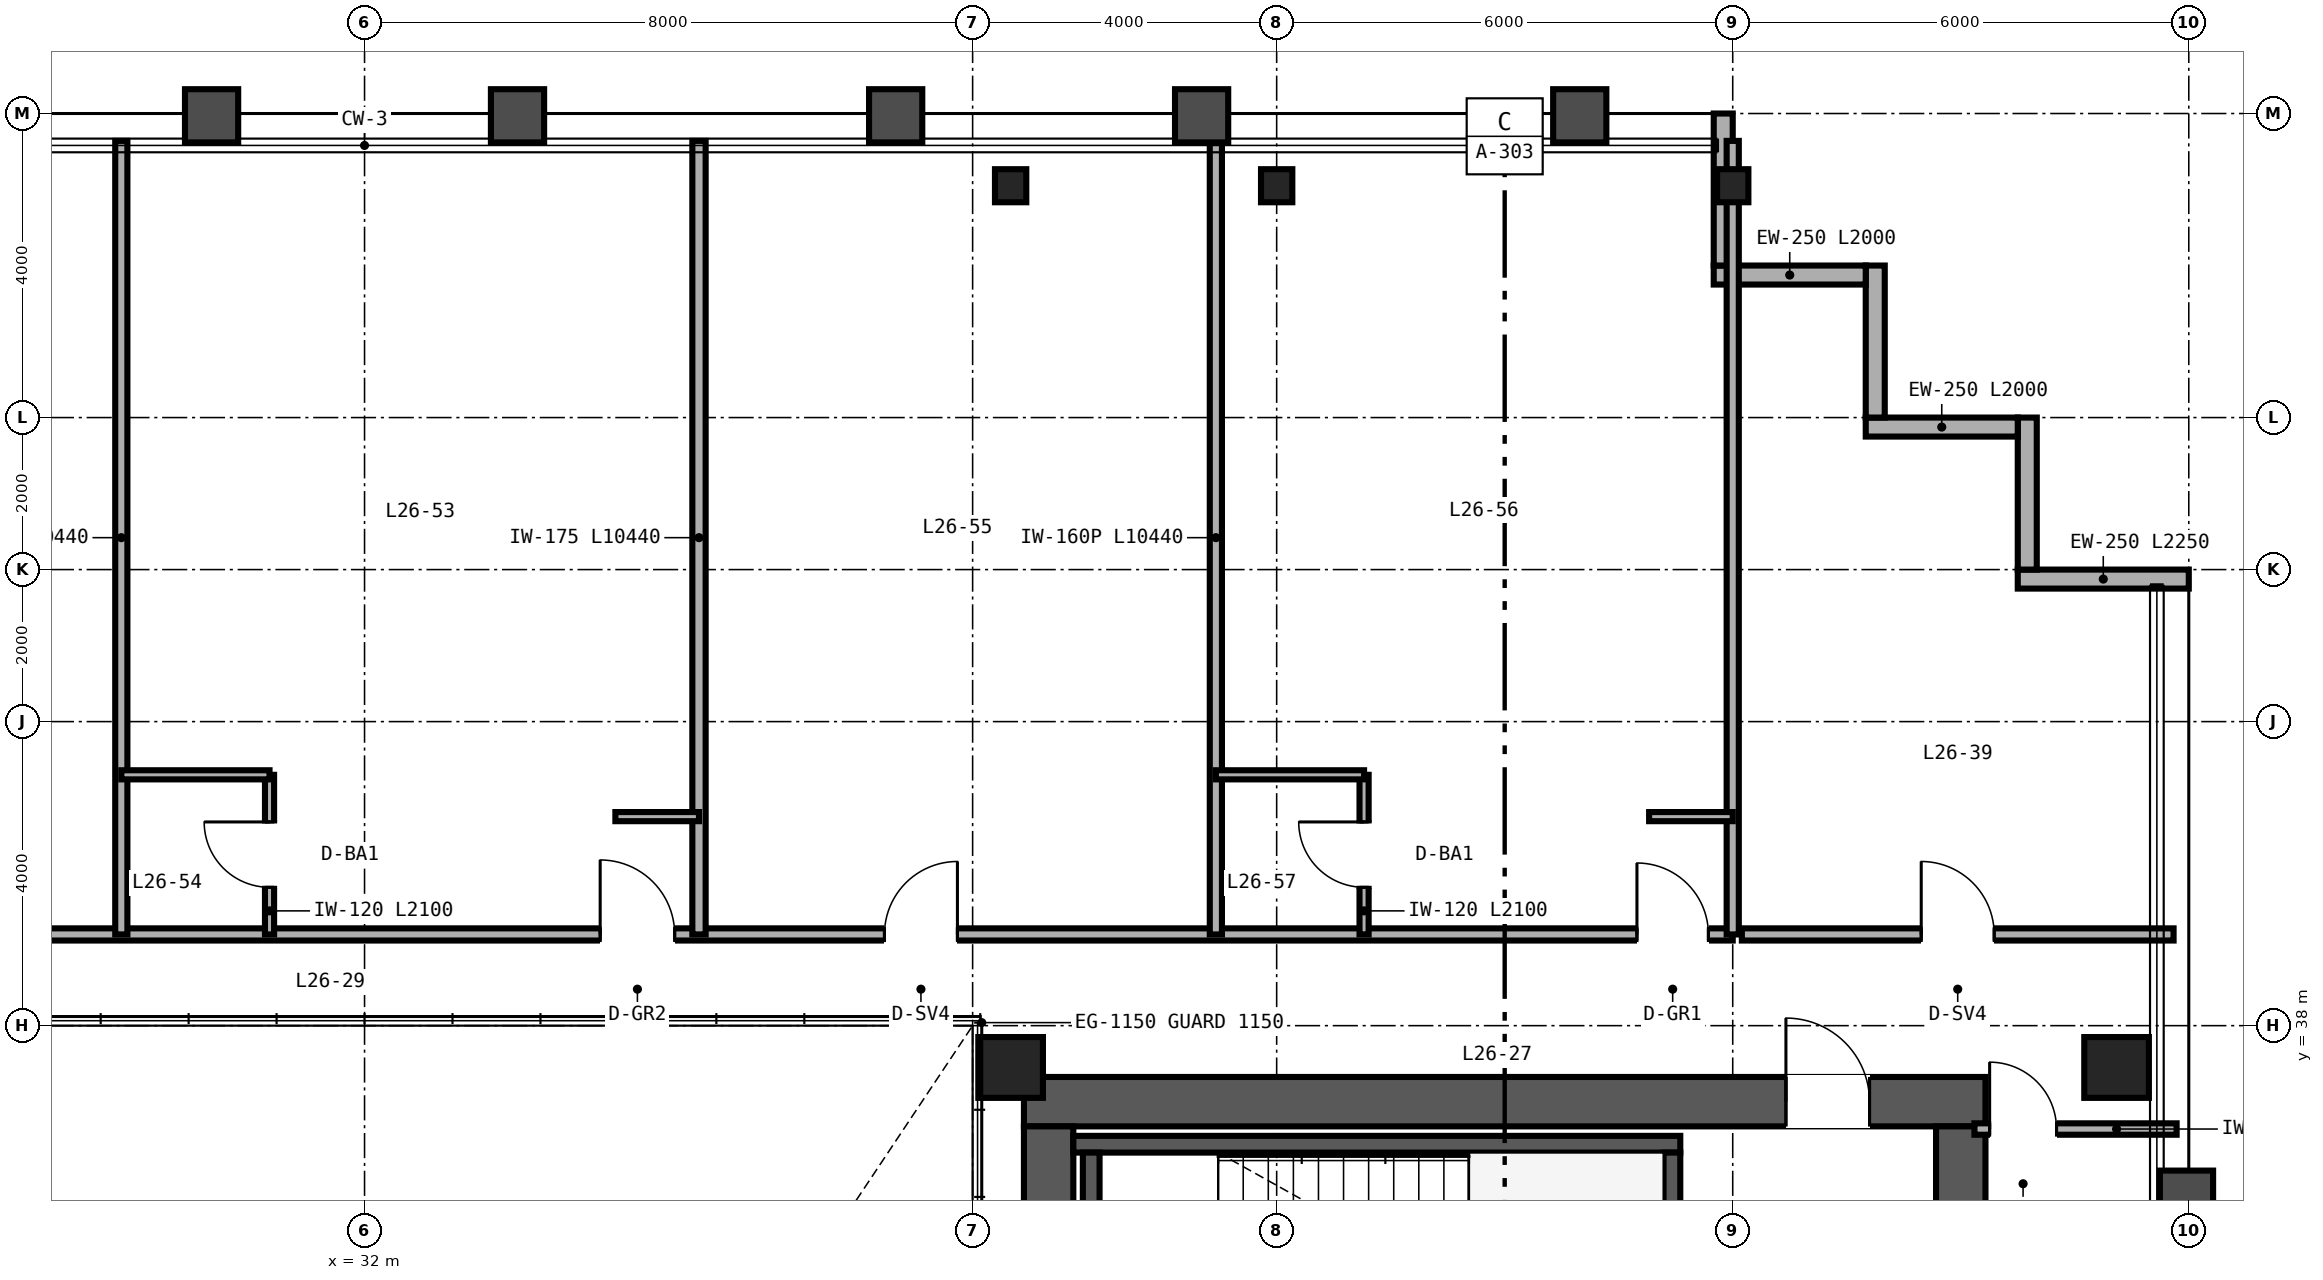
"""IFC4 building model, lengths in metres.
Left out: names, types, materials, properties, quantities, classifications, styles, units other than length and angle.
Written with IfcOpenShell. Run it as: python <this file> out.ifc"""

import sys

from ifc_helpers import new_model, si_unit, direction, frame, frame_2d, origin, origin_2d, place, context, subcontext, project, spatial, rectangle, hollow_rectangle, i_section, extrude, source, transform, mapped, element, fill, save


model = new_model("IFC4")
c1 = context("Model", 3, precision=1e-05, world=origin(), true_north=direction((0.0, 1.0)))
c2 = subcontext(c1, "Body", "Model", "MODEL_VIEW")
j1 = project(units=[si_unit("LENGTHUNIT", "METRE"), si_unit("PLANEANGLEUNIT", "RADIAN")], contexts=[c1])
p1 = place(None, origin())
s1 = spatial("IfcSite", under=j1, at=p1, CompositionType="ELEMENT")
p2 = place(p1, origin())
s2 = spatial("IfcBuilding", under=s1, at=p2, CompositionType="ELEMENT")
p3 = place(p2, frame((0.0, 0.0, 108.0)))
s3 = spatial("IfcBuildingStorey", under=s2, at=p3, CompositionType="ELEMENT", Elevation=108.0)
p4 = place(p3, frame((40.675, 37.0, 0.0), z_axis=(0.0, 0.0, 1.0), x_axis=(1.0, 0.0, 0.0)))
e1 = element("IfcWall", 1, at=p4, inside=s3, PredefinedType="SHEAR", context=c2, shape_type="SweptSolid", body=[
    extrude(rectangle(XDim=12.65, YDim=0.65, at=frame_2d((6.325, 0.0))), origin(), (0.0, 0.0, 1.0), 3.36),
])
p5 = place(p4, frame((10.025, 0.0, 0.0)))
e2 = element("IfcOpeningElement", 2, at=p5, cuts=e1, PredefinedType="OPENING", context=c2, shape_type="SweptSolid", body=[
    extrude(rectangle(XDim=1.1, YDim=2.15, at=frame_2d((0.55, 1.075))), frame((0.0, 0.335, 0.0), z_axis=(0.0, -1.0, 0.0), x_axis=(1.0, 0.0, 0.0)), (0.0, 0.0, 1.0), 0.67),
])
for number, where, z_axis, x_axis in (
    (3, (41.0, 15.325, 0.0), (0.0, 0.0, 1.0), (0.0, 1.0, 0.0)),
    (4, (53.0, 15.325, 0.0), (0.0, 0.0, 1.0), (0.0, 1.0, 0.0)),
):
    element("IfcWall", number, at=place(p3, frame(where, z_axis=z_axis, x_axis=x_axis)), inside=s3, PredefinedType="SHEAR", context=c2, shape_type="SweptSolid", body=[
        extrude(rectangle(XDim=21.35, YDim=0.65, at=frame_2d((10.675, 0.0))), origin(), (0.0, 0.0, 1.0), 3.36),
    ])
p6 = place(p3, frame((41.325, 36.44, 0.0), z_axis=(0.0, 0.0, 1.0), x_axis=(1.0, 0.0, 0.0)))
e5 = element("IfcWall", 5, at=p6, inside=s3, PredefinedType="SHEAR", context=c2, shape_type="SweptSolid", body=[
    extrude(rectangle(XDim=7.985, YDim=0.22, at=frame_2d((3.993, 0.0))), origin(), (0.0, 0.0, 1.0), 3.4),
])
for number, where, z_axis, x_axis in (
    (6, (41.56, 33.05, 0.0), (0.0, 0.0, 1.0), (0.0, 1.0, 0.0)),
    (7, (49.2, 33.05, 0.0), (0.0, 0.0, 1.0), (0.0, 1.0, 0.0)),
):
    element("IfcWall", number, at=place(p3, frame(where, z_axis=z_axis, x_axis=x_axis)), inside=s3, PredefinedType="SHEAR", context=c2, shape_type="SweptSolid", body=[
        extrude(rectangle(XDim=3.28, YDim=0.22, at=frame_2d((1.64, 0.0))), origin(), (0.0, 0.0, 1.0), 3.4),
    ])
m1 = source(origin(), c2, "Body", "SweptSolid", [
    extrude(hollow_rectangle(XDim=0.85, YDim=0.8, WallThickness=0.032, at=origin_2d()), origin(), (0.0, 0.0, 1.0), 3.36),
])
for number, where, z_axis, x_axis in (
    (8, (40.5, 37.45, 0.0), (0.0, 0.0, 1.0), (1.0, 0.0, 0.0)),
    (9, (55.05, 37.45, 0.0), (0.0, 0.0, 1.0), (1.0, 0.0, 0.0)),
):
    element("IfcColumn", number, at=place(p3, frame(where, z_axis=z_axis, x_axis=x_axis)), inside=s3, PredefinedType="COLUMN", context=c2, shape_type="MappedRepresentation", body=[
        mapped(m1, transform((0.0, 0.0, 0.0), scale=1.0)),
    ])
m2 = source(origin(), c2, "Body", "SweptSolid", [
    extrude(i_section(OverallWidth=0.412, OverallDepth=0.435, WebThickness=0.036, FlangeThickness=0.057, FilletRadius=0.025, at=origin_2d()), origin(), (0.0, 0.0, 1.0), 3.36),
])
for number, where, z_axis, x_axis in (
    (10, (40.5, 49.05, 0.0), (0.0, 0.0, 1.0), (1.0, 0.0, 0.0)),
    (11, (44.0, 49.05, 0.0), (0.0, 0.0, 1.0), (1.0, 0.0, 0.0)),
    (12, (50.0, 49.05, 0.0), (0.0, 0.0, 1.0), (1.0, 0.0, 0.0)),
):
    element("IfcColumn", number, at=place(p3, frame(where, z_axis=z_axis, x_axis=x_axis)), inside=s3, PredefinedType="COLUMN", context=c2, shape_type="MappedRepresentation", body=[
        mapped(m2, transform((0.0, 0.0, 0.0), scale=1.0)),
    ])
p7 = place(p3, frame((56.0, 43.875, 0.0), z_axis=(0.0, 0.0, 1.0), x_axis=(-1.0, 0.0, 0.0)))
e13 = element("IfcWall", 13, at=p7, inside=s3, PredefinedType="SOLIDWALL", context=c2, shape_type="SweptSolid", body=[
    extrude(rectangle(XDim=2.25, YDim=0.25, at=frame_2d((1.125, 0.0))), origin(), (0.0, 0.0, 1.0), 3.36),
])
for number, where, z_axis, x_axis in (
    (14, (53.875, 44.0, 0.0), (0.0, 0.0, 1.0), (0.0, 1.0, 0.0)),
    (15, (53.75, 45.875, 0.0), (0.0, 0.0, 1.0), (-1.0, 0.0, 0.0)),
    (16, (51.875, 46.0, 0.0), (0.0, 0.0, 1.0), (0.0, 1.0, 0.0)),
    (17, (51.75, 47.875, 0.0), (0.0, 0.0, 1.0), (-1.0, 0.0, 0.0)),
):
    element("IfcWall", number, at=place(p3, frame(where, z_axis=z_axis, x_axis=x_axis)), inside=s3, PredefinedType="SOLIDWALL", context=c2, shape_type="SweptSolid", body=[
        extrude(rectangle(XDim=2.0, YDim=0.25, at=frame_2d((1.0, 0.0))), origin(), (0.0, 0.0, 1.0), 3.36),
    ])
p8 = place(p3, frame((49.875, 48.0, 0.0), z_axis=(0.0, 0.0, 1.0), x_axis=(0.0, 1.0, 0.0)))
e18 = element("IfcWall", 18, at=p8, inside=s3, PredefinedType="SOLIDWALL", context=c2, shape_type="SweptSolid", body=[
    extrude(rectangle(XDim=2.0, YDim=0.25, at=frame_2d((1.0, 0.0))), origin(), (0.0, 0.0, 1.0), 2.667),
])
p9 = place(p3, frame((53.18, 36.64, 0.0), z_axis=(0.0, 0.0, 1.0), x_axis=(1.0, 0.0, 0.0)))
e19 = element("IfcWall", 19, at=p9, inside=s3, PredefinedType="PARTITIONING", context=c2, shape_type="SweptSolid", body=[
    extrude(rectangle(XDim=2.66, YDim=0.15, at=frame_2d((1.33, 0.0))), origin(), (0.0, 0.0, 1.0), 2.743),
])
p10 = place(p9, frame((0.2, 0.0, 0.0)))
e20 = element("IfcOpeningElement", 20, at=p10, cuts=e19, PredefinedType="OPENING", context=c2, shape_type="SweptSolid", body=[
    extrude(rectangle(XDim=0.88, YDim=2.15, at=frame_2d((0.44, 1.075))), frame((0.0, 0.085, 0.0), z_axis=(0.0, -1.0, 0.0), x_axis=(1.0, 0.0, 0.0)), (0.0, 0.0, 1.0), 0.17),
])
p11 = place(p3, frame((50.12, 39.2, 0.0), z_axis=(0.0, 0.0, 1.0), x_axis=(1.0, 0.0, 0.0)))
e21 = element("IfcWall", 21, at=p11, inside=s3, PredefinedType="PARTITIONING", context=c2, shape_type="SweptSolid", body=[
    extrude(rectangle(XDim=5.68, YDim=0.16, at=frame_2d((2.84, 0.0))), origin(), (0.0, 0.0, 1.0), 3.36),
])
p12 = place(p11, frame((2.36, 0.0, 0.0)))
e22 = element("IfcOpeningElement", 22, at=p12, cuts=e21, PredefinedType="OPENING", context=c2, shape_type="SweptSolid", body=[
    extrude(rectangle(XDim=0.96, YDim=2.15, at=frame_2d((0.48, 1.075))), frame((0.0, 0.09, 0.0), z_axis=(0.0, -1.0, 0.0), x_axis=(1.0, 0.0, 0.0)), (0.0, 0.0, 1.0), 0.18),
])
p13 = place(p3, frame((14.0, 39.2, 0.0), z_axis=(0.0, 0.0, 1.0), x_axis=(1.0, 0.0, 0.0)))
e23 = element("IfcWall", 23, at=p13, inside=s3, PredefinedType="PARTITIONING", context=c2, shape_type="SweptSolid", body=[
    extrude(rectangle(XDim=36.0, YDim=0.16, at=frame_2d((18.0, 0.0))), origin(), (0.0, 0.0, 1.0), 2.581),
])
p14 = place(p13, frame((6.1, 0.0, 0.0)))
e24 = element("IfcOpeningElement", 24, at=p14, cuts=e23, PredefinedType="OPENING", context=c2, shape_type="SweptSolid", body=[
    extrude(rectangle(XDim=0.98, YDim=2.2, at=frame_2d((0.49, 1.1))), frame((0.0, 0.09, 0.0), z_axis=(0.0, -1.0, 0.0), x_axis=(1.0, 0.0, 0.0)), (0.0, 0.0, 1.0), 0.18),
])
p15 = place(p13, frame((10.62, 0.0, 0.0)))
e25 = element("IfcOpeningElement", 25, at=p15, cuts=e23, PredefinedType="OPENING", context=c2, shape_type="SweptSolid", body=[
    extrude(rectangle(XDim=0.96, YDim=2.15, at=frame_2d((0.48, 1.075))), frame((0.0, 0.09, 0.0), z_axis=(0.0, -1.0, 0.0), x_axis=(1.0, 0.0, 0.0)), (0.0, 0.0, 1.0), 0.18),
])
p16 = place(p13, frame((21.1, 0.0, 0.0)))
e26 = element("IfcOpeningElement", 26, at=p16, cuts=e23, PredefinedType="OPENING", context=c2, shape_type="SweptSolid", body=[
    extrude(rectangle(XDim=0.98, YDim=2.2, at=frame_2d((0.49, 1.1))), frame((0.0, 0.09, 0.0), z_axis=(0.0, -1.0, 0.0), x_axis=(1.0, 0.0, 0.0)), (0.0, 0.0, 1.0), 0.18),
])
p17 = place(p13, frame((24.84, 0.0, 0.0)))
e27 = element("IfcOpeningElement", 27, at=p17, cuts=e23, PredefinedType="OPENING", context=c2, shape_type="SweptSolid", body=[
    extrude(rectangle(XDim=0.96, YDim=2.15, at=frame_2d((0.48, 1.075))), frame((0.0, 0.09, 0.0), z_axis=(0.0, -1.0, 0.0), x_axis=(1.0, 0.0, 0.0)), (0.0, 0.0, 1.0), 0.18),
])
p18 = place(p13, frame((34.74, 0.0, 0.0)))
e28 = element("IfcOpeningElement", 28, at=p18, cuts=e23, PredefinedType="OPENING", context=c2, shape_type="SweptSolid", body=[
    extrude(rectangle(XDim=0.94, YDim=2.15, at=frame_2d((0.47, 1.075))), frame((0.0, 0.09, 0.0), z_axis=(0.0, -1.0, 0.0), x_axis=(1.0, 0.0, 0.0)), (0.0, 0.0, 1.0), 0.18),
])
p19 = place(p3, frame((50.0, 39.2, 0.0), z_axis=(0.0, 0.0, 1.0), x_axis=(0.0, 1.0, 0.0)))
e29 = element("IfcWall", 29, at=p19, inside=s3, PredefinedType="PARTITIONING", context=c2, shape_type="SweptSolid", body=[
    extrude(rectangle(XDim=10.44, YDim=0.16, at=frame_2d((5.22, 0.0))), origin(), (0.0, 0.0, 1.0), 2.667),
])
p20 = place(p3, frame((28.8, 39.2, 0.0), z_axis=(0.0, 0.0, 1.0), x_axis=(0.0, 1.0, 0.0)))
e30 = element("IfcWall", 30, at=p20, inside=s3, PredefinedType="PARTITIONING", context=c2, shape_type="SweptSolid", body=[
    extrude(rectangle(XDim=10.44, YDim=0.16, at=frame_2d((5.22, 0.0))), origin(), (0.0, 0.0, 1.0), 2.433),
])
p21 = place(p3, frame((36.4, 39.2, 0.0), z_axis=(0.0, 0.0, 1.0), x_axis=(0.0, 1.0, 0.0)))
e31 = element("IfcWall", 31, at=p21, inside=s3, PredefinedType="PARTITIONING", context=c2, shape_type="SweptSolid", body=[
    extrude(rectangle(XDim=10.44, YDim=0.175, at=frame_2d((5.22, 0.0))), origin(), (0.0, 0.0, 1.0), 2.433),
])
p22 = place(p3, frame((30.75, 39.2, 0.0), z_axis=(0.0, 0.0, 1.0), x_axis=(0.0, 1.0, 0.0)))
e32 = element("IfcWall", 32, at=p22, inside=s3, PredefinedType="PARTITIONING", context=c2, shape_type="SweptSolid", body=[
    extrude(rectangle(XDim=2.1, YDim=0.12, at=frame_2d((1.05, 0.0))), origin(), (0.0, 0.0, 1.0), 3.36),
])
p23 = place(p22, frame((0.62, 0.0, 0.0)))
e33 = element("IfcOpeningElement", 33, at=p23, cuts=e32, PredefinedType="OPENING", context=c2, shape_type="SweptSolid", body=[
    extrude(rectangle(XDim=0.86, YDim=2.1, at=frame_2d((0.43, 1.05))), frame((0.0, 0.07, 0.0), z_axis=(0.0, -1.0, 0.0), x_axis=(1.0, 0.0, 0.0)), (0.0, 0.0, 1.0), 0.14),
])
p24 = place(p3, frame((28.8, 41.3, 0.0), z_axis=(0.0, 0.0, 1.0), x_axis=(1.0, 0.0, 0.0)))
e34 = element("IfcWall", 34, at=p24, inside=s3, PredefinedType="PARTITIONING", context=c2, shape_type="SweptSolid", body=[
    extrude(rectangle(XDim=1.95, YDim=0.12, at=frame_2d((0.975, 0.0))), origin(), (0.0, 0.0, 1.0), 3.36),
])
p25 = place(p3, frame((35.3, 40.75, 0.0), z_axis=(0.0, 0.0, 1.0), x_axis=(1.0, 0.0, 0.0)))
e35 = element("IfcWall", 35, at=p25, inside=s3, PredefinedType="PARTITIONING", context=c2, shape_type="SweptSolid", body=[
    extrude(rectangle(XDim=1.1, YDim=0.12, at=frame_2d((0.55, 0.0))), origin(), (0.0, 0.0, 1.0), 3.36),
])
p26 = place(p3, frame((43.2, 39.2, 0.0), z_axis=(0.0, 0.0, 1.0), x_axis=(0.0, 1.0, 0.0)))
e36 = element("IfcWall", 36, at=p26, inside=s3, PredefinedType="PARTITIONING", context=c2, shape_type="SweptSolid", body=[
    extrude(rectangle(XDim=10.44, YDim=0.16, at=frame_2d((5.22, 0.0))), origin(), (0.0, 0.0, 1.0), 2.823),
])
p27 = place(p3, frame((45.15, 39.2, 0.0), z_axis=(0.0, 0.0, 1.0), x_axis=(0.0, 1.0, 0.0)))
e37 = element("IfcWall", 37, at=p27, inside=s3, PredefinedType="PARTITIONING", context=c2, shape_type="SweptSolid", body=[
    extrude(rectangle(XDim=2.1, YDim=0.12, at=frame_2d((1.05, 0.0))), origin(), (0.0, 0.0, 1.0), 3.36),
])
p28 = place(p27, frame((0.62, 0.0, 0.0)))
e38 = element("IfcOpeningElement", 38, at=p28, cuts=e37, PredefinedType="OPENING", context=c2, shape_type="SweptSolid", body=[
    extrude(rectangle(XDim=0.86, YDim=2.1, at=frame_2d((0.43, 1.05))), frame((0.0, 0.07, 0.0), z_axis=(0.0, -1.0, 0.0), x_axis=(1.0, 0.0, 0.0)), (0.0, 0.0, 1.0), 0.14),
])
p29 = place(p3, frame((43.2, 41.3, 0.0), z_axis=(0.0, 0.0, 1.0), x_axis=(1.0, 0.0, 0.0)))
e39 = element("IfcWall", 39, at=p29, inside=s3, PredefinedType="PARTITIONING", context=c2, shape_type="SweptSolid", body=[
    extrude(rectangle(XDim=1.95, YDim=0.12, at=frame_2d((0.975, 0.0))), origin(), (0.0, 0.0, 1.0), 3.36),
])
p30 = place(p3, frame((48.9, 40.75, 0.0), z_axis=(0.0, 0.0, 1.0), x_axis=(1.0, 0.0, 0.0)))
e40 = element("IfcWall", 40, at=p30, inside=s3, PredefinedType="PARTITIONING", context=c2, shape_type="SweptSolid", body=[
    extrude(rectangle(XDim=1.1, YDim=0.12, at=frame_2d((0.55, 0.0))), origin(), (0.0, 0.0, 1.0), 3.36),
])
m3 = source(origin(), c2, "Body", "SweptSolid", [
    extrude(rectangle(XDim=1.1, YDim=2.15, at=frame_2d((0.55, 1.075))), frame((0.0, 0.025, 0.0), z_axis=(0.0, -1.0, 0.0), x_axis=(1.0, 0.0, 0.0)), (0.0, 0.0, 1.0), 0.05),
])
p31 = place(p5, origin())
e41 = element("IfcDoor", 41, at=p31, inside=s3, OperationType="SINGLE_SWING_LEFT", PredefinedType="DOOR", context=c2, shape_type="MappedRepresentation", body=[
    mapped(m3, transform((0.0, 0.0, 0.0), scale=1.0)),
])
fill(e2, e41)
m4 = source(origin(), c2, "Body", "SweptSolid", [
    extrude(rectangle(XDim=0.88, YDim=2.15, at=frame_2d((0.44, 1.075))), frame((0.0, 0.025, 0.0), z_axis=(0.0, -1.0, 0.0), x_axis=(1.0, 0.0, 0.0)), (0.0, 0.0, 1.0), 0.05),
])
p32 = place(p10, origin())
e42 = element("IfcDoor", 42, at=p32, inside=s3, OperationType="SINGLE_SWING_LEFT", PredefinedType="DOOR", context=c2, shape_type="MappedRepresentation", body=[
    mapped(m4, transform((0.0, 0.0, 0.0), scale=1.0)),
])
fill(e20, e42)
m5 = source(origin(), c2, "Body", "SweptSolid", [
    extrude(rectangle(XDim=0.96, YDim=2.15, at=frame_2d((0.48, 1.075))), frame((0.0, 0.025, 0.0), z_axis=(0.0, -1.0, 0.0), x_axis=(1.0, 0.0, 0.0)), (0.0, 0.0, 1.0), 0.05),
])
p33 = place(p12, origin())
e43 = element("IfcDoor", 43, at=p33, inside=s3, OperationType="SINGLE_SWING_LEFT", PredefinedType="DOOR", context=c2, shape_type="MappedRepresentation", body=[
    mapped(m5, transform((0.0, 0.0, 0.0), scale=1.0)),
])
fill(e22, e43)
m6 = source(origin(), c2, "Body", "SweptSolid", [
    extrude(rectangle(XDim=0.86, YDim=2.1, at=frame_2d((0.43, 1.05))), frame((0.0, 0.025, 0.0), z_axis=(0.0, -1.0, 0.0), x_axis=(1.0, 0.0, 0.0)), (0.0, 0.0, 1.0), 0.05),
])
p34 = place(p23, origin())
e44 = element("IfcDoor", 44, at=p34, inside=s3, OperationType="SINGLE_SWING_RIGHT", PredefinedType="DOOR", context=c2, shape_type="MappedRepresentation", body=[
    mapped(m6, transform((0.0, 0.0, 0.0), scale=1.0)),
])
fill(e33, e44)
p35 = place(p28, origin())
e45 = element("IfcDoor", 45, at=p35, inside=s3, OperationType="SINGLE_SWING_RIGHT", PredefinedType="DOOR", context=c2, shape_type="MappedRepresentation", body=[
    mapped(m6, transform((0.0, 0.0, 0.0), scale=1.0)),
])
fill(e38, e45)
m7 = source(origin(), c2, "Body", "SweptSolid", [
    extrude(rectangle(XDim=0.98, YDim=2.2, at=frame_2d((0.49, 1.1))), frame((0.0, 0.025, 0.0), z_axis=(0.0, -1.0, 0.0), x_axis=(1.0, 0.0, 0.0)), (0.0, 0.0, 1.0), 0.05),
])
p36 = place(p16, origin())
e46 = element("IfcDoor", 46, at=p36, inside=s3, OperationType="SINGLE_SWING_LEFT", PredefinedType="DOOR", context=c2, shape_type="MappedRepresentation", body=[
    mapped(m7, transform((0.0, 0.0, 0.0), scale=1.0)),
])
fill(e26, e46)
p37 = place(p17, origin())
e47 = element("IfcDoor", 47, at=p37, inside=s3, OperationType="SINGLE_SWING_RIGHT", PredefinedType="DOOR", context=c2, shape_type="MappedRepresentation", body=[
    mapped(m5, transform((0.0, 0.0, 0.0), scale=1.0)),
])
fill(e27, e47)
m8 = source(origin(), c2, "Body", "SweptSolid", [
    extrude(rectangle(XDim=0.94, YDim=2.15, at=frame_2d((0.47, 1.075))), frame((0.0, 0.025, 0.0), z_axis=(0.0, -1.0, 0.0), x_axis=(1.0, 0.0, 0.0)), (0.0, 0.0, 1.0), 0.05),
])
p38 = place(p18, origin())
e48 = element("IfcDoor", 48, at=p38, inside=s3, OperationType="SINGLE_SWING_LEFT", PredefinedType="DOOR", context=c2, shape_type="MappedRepresentation", body=[
    mapped(m8, transform((0.0, 0.0, 0.0), scale=1.0)),
])
fill(e28, e48)
save(model, sys.argv[1])
